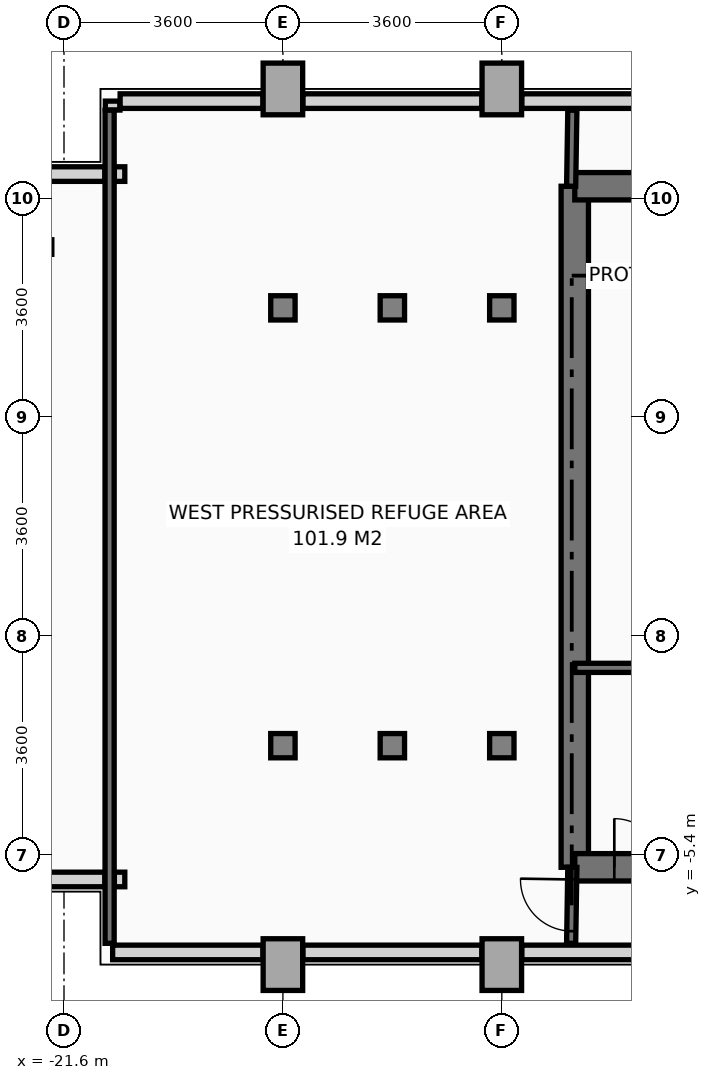
"""IFC4 building model, lengths in metres.
Left out: names, types, materials, properties, quantities, classifications, styles, units other than length and angle.
Written with IfcOpenShell. Run it as: python <this file> out.ifc"""

import sys

from ifc_helpers import new_model, si_unit, direction, frame, frame_2d, origin, origin_2d, place, context, subcontext, project, spatial, rectangle, i_section, extrude, source, transform, mapped, element, fill, save


model = new_model("IFC4")
c1 = context("Model", 3, precision=1e-05, world=origin(), true_north=direction((0.0, 1.0)))
c2 = subcontext(c1, "Body", "Model", "MODEL_VIEW")
j1 = project(units=[si_unit("LENGTHUNIT", "METRE"), si_unit("PLANEANGLEUNIT", "RADIAN")], contexts=[c1])
p1 = place(None, origin())
s1 = spatial("IfcSite", under=j1, at=p1, CompositionType="ELEMENT")
p2 = place(p1, origin())
s2 = spatial("IfcBuilding", under=s1, at=p2, CompositionType="ELEMENT")
p3 = place(p2, frame((0.0, 0.0, 151.6)))
s3 = spatial("IfcBuildingStorey", under=s2, at=p3, CompositionType="ELEMENT", Elevation=151.6)
m1 = source(origin(), c2, "Body", "SweptSolid", [
    extrude(rectangle(XDim=0.65, YDim=0.85, at=origin_2d()), origin(), (0.0, 0.0, 1.0), 4.4),
])
p4 = place(p3, frame((-18.0, -7.2, 0.0), z_axis=(0.0, 0.0, 1.0), x_axis=(1.0, 0.0, 0.0)))
e1 = element("IfcColumn", 1, at=p4, inside=s3, PredefinedType="COLUMN", context=c2, shape_type="MappedRepresentation", body=[
    mapped(m1, transform((0.0, 0.0, 0.0), x_axis=(1.0, 0.0, 0.0), y_axis=(0.0, 1.0, 0.0), z_axis=(0.0, 0.0, 1.0), scale=1.0)),
])
m2 = source(origin(), c2, "Body", "SweptSolid", [
    extrude(i_section(OverallWidth=0.401, OverallDepth=0.399, WebThickness=0.02, FlangeThickness=0.032, at=origin_2d()), origin(), (0.0, 0.0, 1.0), 4.4),
])
for number, where, z_axis, x_axis in (
    (2, (-18.0, -3.6, 0.0), (0.0, 0.0, 1.0), (1.0, 0.0, 0.0)),
    (3, (-18.0, 3.6, 0.0), (0.0, 0.0, 1.0), (1.0, 0.0, 0.0)),
):
    element("IfcColumn", number, at=place(p3, frame(where, z_axis=z_axis, x_axis=x_axis)), inside=s3, PredefinedType="COLUMN", context=c2, shape_type="MappedRepresentation", body=[
        mapped(m2, transform((0.0, 0.0, 0.0), x_axis=(1.0, 0.0, 0.0), y_axis=(0.0, 1.0, 0.0), z_axis=(0.0, 0.0, 1.0), scale=1.0)),
    ])
p5 = place(p3, frame((-18.0, 7.2, 0.0), z_axis=(0.0, 0.0, 1.0), x_axis=(1.0, 0.0, 0.0)))
e4 = element("IfcColumn", 4, at=p5, inside=s3, PredefinedType="COLUMN", context=c2, shape_type="MappedRepresentation", body=[
    mapped(m1, transform((0.0, 0.0, 0.0), x_axis=(1.0, 0.0, 0.0), y_axis=(0.0, 1.0, 0.0), z_axis=(0.0, 0.0, 1.0), scale=1.0)),
])
for number, where, z_axis, x_axis in (
    (5, (-16.2, -3.6, 0.0), (0.0, 0.0, 1.0), (1.0, 0.0, 0.0)),
    (6, (-16.2, 3.6, 0.0), (0.0, 0.0, 1.0), (1.0, 0.0, 0.0)),
):
    element("IfcColumn", number, at=place(p3, frame(where, z_axis=z_axis, x_axis=x_axis)), inside=s3, PredefinedType="COLUMN", context=c2, shape_type="MappedRepresentation", body=[
        mapped(m2, transform((0.0, 0.0, 0.0), x_axis=(1.0, 0.0, 0.0), y_axis=(0.0, 1.0, 0.0), z_axis=(0.0, 0.0, 1.0), scale=1.0)),
    ])
p6 = place(p3, frame((-14.4, -7.2, 0.0), z_axis=(0.0, 0.0, 1.0), x_axis=(1.0, 0.0, 0.0)))
e7 = element("IfcColumn", 7, at=p6, inside=s3, PredefinedType="COLUMN", context=c2, shape_type="MappedRepresentation", body=[
    mapped(m1, transform((0.0, 0.0, 0.0), x_axis=(1.0, 0.0, 0.0), y_axis=(0.0, 1.0, 0.0), z_axis=(0.0, 0.0, 1.0), scale=1.0)),
])
for number, where, z_axis, x_axis in (
    (8, (-14.4, -3.6, 0.0), (0.0, 0.0, 1.0), (1.0, 0.0, 0.0)),
    (9, (-14.4, 3.6, 0.0), (0.0, 0.0, 1.0), (1.0, 0.0, 0.0)),
):
    element("IfcColumn", number, at=place(p3, frame(where, z_axis=z_axis, x_axis=x_axis)), inside=s3, PredefinedType="COLUMN", context=c2, shape_type="MappedRepresentation", body=[
        mapped(m2, transform((0.0, 0.0, 0.0), x_axis=(1.0, 0.0, 0.0), y_axis=(0.0, 1.0, 0.0), z_axis=(0.0, 0.0, 1.0), scale=1.0)),
    ])
p7 = place(p3, frame((-14.4, 7.2, 0.0), z_axis=(0.0, 0.0, 1.0), x_axis=(1.0, 0.0, 0.0)))
e10 = element("IfcColumn", 10, at=p7, inside=s3, PredefinedType="COLUMN", context=c2, shape_type="MappedRepresentation", body=[
    mapped(m1, transform((0.0, 0.0, 0.0), x_axis=(1.0, 0.0, 0.0), y_axis=(0.0, 1.0, 0.0), z_axis=(0.0, 0.0, 1.0), scale=1.0)),
])
p8 = place(p3, frame((-9.523, -7.0, 0.0), z_axis=(0.0, 0.0, 1.0), x_axis=(-1.0, 0.0, 0.0)))
e11 = element("IfcWall", 11, at=p8, inside=s3, PredefinedType="PARAPET", context=c2, shape_type="SweptSolid", body=[
    extrude(rectangle(XDim=4.549, YDim=0.24, at=frame_2d((2.274, 0.0))), origin(), (0.0, 0.0, 1.0), 1.15),
])
p9 = place(p3, frame((-14.728, -7.0, 0.0), z_axis=(0.0, 0.0, 1.0), x_axis=(-1.0, 0.0, 0.0)))
e12 = element("IfcWall", 12, at=p9, inside=s3, PredefinedType="PARAPET", context=c2, shape_type="SweptSolid", body=[
    extrude(rectangle(XDim=2.944, YDim=0.24, at=frame_2d((1.472, 0.0))), origin(), (0.0, 0.0, 1.0), 1.15),
])
p10 = place(p3, frame((-18.328, -7.0, 0.0), z_axis=(0.0, 0.0, 1.0), x_axis=(-1.0, 0.0, 0.0)))
e13 = element("IfcWall", 13, at=p10, inside=s3, PredefinedType="PARAPET", context=c2, shape_type="SweptSolid", body=[
    extrude(rectangle(XDim=2.472, YDim=0.24, at=frame_2d((1.236, 0.0))), origin(), (0.0, 0.0, 1.0), 1.15),
])
p11 = place(p3, frame((-20.6, -5.8, 0.0), z_axis=(0.0, 0.0, 1.0), x_axis=(-1.0, 0.0, 0.0)))
e14 = element("IfcWall", 14, at=p11, inside=s3, PredefinedType="PARAPET", context=c2, shape_type="SweptSolid", body=[
    extrude(rectangle(XDim=0.172, YDim=0.24, at=frame_2d((0.086, 0.0))), origin(), (0.0, 0.0, 1.0), 1.15),
])
p12 = place(p3, frame((-20.928, -5.8, 0.0), z_axis=(0.0, 0.0, 1.0), x_axis=(-1.0, 0.0, 0.0)))
e15 = element("IfcWall", 15, at=p12, inside=s3, PredefinedType="PARAPET", context=c2, shape_type="SweptSolid", body=[
    extrude(rectangle(XDim=1.072, YDim=0.24, at=frame_2d((0.536, 0.0))), origin(), (0.0, 0.0, 1.0), 1.15),
])
p13 = place(p3, frame((-21.877, 5.8, 0.0), z_axis=(0.0, 0.0, 1.0), x_axis=(1.0, 0.0, 0.0)))
e16 = element("IfcWall", 16, at=p13, inside=s3, PredefinedType="PARAPET", context=c2, shape_type="SweptSolid", body=[
    extrude(rectangle(XDim=0.949, YDim=0.24, at=frame_2d((0.475, 0.0))), origin(), (0.0, 0.0, 1.0), 1.15),
])
p14 = place(p3, frame((-20.772, 5.8, 0.0), z_axis=(0.0, 0.0, 1.0), x_axis=(1.0, 0.0, 0.0)))
e17 = element("IfcWall", 17, at=p14, inside=s3, PredefinedType="PARAPET", context=c2, shape_type="SweptSolid", body=[
    extrude(rectangle(XDim=0.172, YDim=0.24, at=frame_2d((0.086, 0.0))), origin(), (0.0, 0.0, 1.0), 1.15),
])
p15 = place(p3, frame((-20.8, 6.853, 0.0), z_axis=(0.0, 0.0, 1.0), x_axis=(0.0, 1.0, 0.0)))
e18 = element("IfcWall", 18, at=p15, inside=s3, PredefinedType="PARAPET", context=c2, shape_type="SweptSolid", body=[
    extrude(rectangle(XDim=0.147, YDim=0.24, at=frame_2d((0.073, 0.0))), origin(), (0.0, 0.0, 1.0), 1.15),
])
p16 = place(p3, frame((-20.677, 7.0, 0.0), z_axis=(0.0, 0.0, 1.0), x_axis=(1.0, 0.0, 0.0)))
e19 = element("IfcWall", 19, at=p16, inside=s3, PredefinedType="PARAPET", context=c2, shape_type="SweptSolid", body=[
    extrude(rectangle(XDim=2.349, YDim=0.24, at=frame_2d((1.175, 0.0))), origin(), (0.0, 0.0, 1.0), 1.15),
])
p17 = place(p3, frame((-17.672, 7.0, 0.0), z_axis=(0.0, 0.0, 1.0), x_axis=(1.0, 0.0, 0.0)))
e20 = element("IfcWall", 20, at=p17, inside=s3, PredefinedType="PARAPET", context=c2, shape_type="SweptSolid", body=[
    extrude(rectangle(XDim=2.944, YDim=0.24, at=frame_2d((1.472, 0.0))), origin(), (0.0, 0.0, 1.0), 1.15),
])
p18 = place(p3, frame((-14.072, 7.0, 0.0), z_axis=(0.0, 0.0, 1.0), x_axis=(1.0, 0.0, 0.0)))
e21 = element("IfcWall", 21, at=p18, inside=s3, PredefinedType="PARAPET", context=c2, shape_type="SweptSolid", body=[
    extrude(rectangle(XDim=2.669, YDim=0.24, at=frame_2d((1.334, 0.0))), origin(), (0.0, 0.0, 1.0), 1.15),
])
p19 = place(p3, frame((-13.2, -5.6, 0.0), z_axis=(0.0, 0.0, 1.0), x_axis=(0.0, 1.0, 0.0)))
e22 = element("IfcWall", 22, at=p19, inside=s3, PredefinedType="SHEAR", context=c2, shape_type="SweptSolid", body=[
    extrude(rectangle(XDim=11.2, YDim=0.45, at=frame_2d((5.6, 0.0))), origin(), (0.0, 0.0, 1.0), 4.4),
])
p20 = place(p3, frame((-13.2, 5.6, 0.0), z_axis=(0.0, 0.0, 1.0), x_axis=(1.0, 0.0, 0.0)))
e23 = element("IfcWall", 23, at=p20, inside=s3, PredefinedType="SHEAR", context=c2, shape_type="SweptSolid", body=[
    extrude(rectangle(XDim=1.819, YDim=0.45, at=frame_2d((0.909, 0.0))), origin(), (0.0, 0.0, 1.0), 4.4),
])
p21 = place(p3, frame((-13.2, -5.6, 0.0), z_axis=(0.0, 0.0, 1.0), x_axis=(1.0, 0.0, 0.0)))
e24 = element("IfcWall", 24, at=p21, inside=s3, PredefinedType="SHEAR", context=c2, shape_type="SweptSolid", body=[
    extrude(rectangle(XDim=7.8, YDim=0.45, at=frame_2d((3.9, 0.0))), origin(), (0.0, 0.0, 1.0), 4.4),
])
p22 = place(p21, frame((3.6, 0.0, 0.0)))
e25 = element("IfcOpeningElement", 25, at=p22, cuts=e24, PredefinedType="OPENING", context=c2, shape_type="SweptSolid", body=[
    extrude(rectangle(XDim=1.2, YDim=2.2, at=frame_2d((0.6, 1.1))), frame((0.0, 0.235, 0.0), z_axis=(0.0, -1.0, 0.0), x_axis=(1.0, 0.0, 0.0)), (0.0, 0.0, 1.0), 0.47),
])
p23 = place(p21, frame((0.65, 0.0, 0.0)))
e26 = element("IfcOpeningElement", 26, at=p23, cuts=e24, PredefinedType="OPENING", context=c2, shape_type="SweptSolid", body=[
    extrude(rectangle(XDim=0.8, YDim=2.1, at=frame_2d((0.4, 1.05))), frame((0.0, 0.235, 0.0), z_axis=(0.0, -1.0, 0.0), x_axis=(1.0, 0.0, 0.0)), (0.0, 0.0, 1.0), 0.47),
])
p24 = place(p3, frame((-13.2, -2.32, 0.0), z_axis=(0.0, 0.0, 1.0), x_axis=(1.0, 0.0, 0.0)))
e27 = element("IfcWall", 27, at=p24, inside=s3, PredefinedType="PARTITIONING", context=c2, shape_type="SweptSolid", body=[
    extrude(rectangle(XDim=2.18, YDim=0.15, at=frame_2d((1.09, 0.0))), origin(), (0.0, 0.0, 1.0), 4.4),
])
p25 = place(p3, frame((-13.26, -6.85, 0.0), z_axis=(0.0, 0.0, 1.0), x_axis=(0.016013571389, 0.999871774545, 0.0)))
e28 = element("IfcWall", 28, at=p25, inside=s3, PredefinedType="PARTITIONING", context=c2, shape_type="SweptSolid", body=[
    extrude(rectangle(XDim=1.25, YDim=0.15, at=frame_2d((0.625, 0.0))), origin(), (0.0, 0.0, 1.0), 4.4),
])
p26 = place(p25, frame((0.2, 0.0, 0.0)))
e29 = element("IfcOpeningElement", 29, at=p26, cuts=e28, PredefinedType="OPENING", context=c2, shape_type="SweptSolid", body=[
    extrude(rectangle(XDim=0.85, YDim=2.1, at=frame_2d((0.425, 1.05))), frame((0.0, 0.085, 0.0), z_axis=(0.0, -1.0, 0.0), x_axis=(1.0, 0.0, 0.0)), (0.0, 0.0, 1.0), 0.17),
])
p27 = place(p3, frame((-13.26, 5.6, 0.0), z_axis=(0.0, 0.0, 1.0), x_axis=(0.016013571389, 0.999871774545, 0.0)))
e30 = element("IfcWall", 30, at=p27, inside=s3, PredefinedType="PARTITIONING", context=c2, shape_type="SweptSolid", body=[
    extrude(rectangle(XDim=1.25, YDim=0.15, at=frame_2d((0.625, 0.0))), origin(), (0.0, 0.0, 1.0), 4.4),
])
p28 = place(p3, frame((-20.85, -6.85, 0.0), z_axis=(0.0, 0.0, 1.0), x_axis=(0.0, 1.0, 0.0)))
e31 = element("IfcWall", 31, at=p28, inside=s3, PredefinedType="PARTITIONING", context=c2, shape_type="SweptSolid", body=[
    extrude(rectangle(XDim=13.7, YDim=0.15, at=frame_2d((6.85, 0.0))), origin(), (0.0, 0.0, 1.0), 4.4),
])
m3 = source(origin(), c2, "Body", "SweptSolid", [
    extrude(rectangle(XDim=0.8, YDim=2.1, at=frame_2d((0.4, 1.05))), frame((0.0, 0.025, 0.0), z_axis=(0.0, -1.0, 0.0), x_axis=(1.0, 0.0, 0.0)), (0.0, 0.0, 1.0), 0.05),
])
p29 = place(p23, origin())
e32 = element("IfcDoor", 32, at=p29, inside=s3, OperationType="SINGLE_SWING_LEFT", PredefinedType="DOOR", context=c2, shape_type="MappedRepresentation", body=[
    mapped(m3, transform((0.0, 0.0, 0.0), x_axis=(1.0, 0.0, 0.0), y_axis=(0.0, 1.0, 0.0), z_axis=(0.0, 0.0, 1.0), scale=1.0)),
])
fill(e26, e32)
m4 = source(origin(), c2, "Body", "SweptSolid", [
    extrude(rectangle(XDim=0.85, YDim=2.1, at=frame_2d((0.425, 1.05))), frame((0.0, 0.025, 0.0), z_axis=(0.0, -1.0, 0.0), x_axis=(1.0, 0.0, 0.0)), (0.0, 0.0, 1.0), 0.05),
])
p30 = place(p26, origin())
e33 = element("IfcDoor", 33, at=p30, inside=s3, OperationType="SINGLE_SWING_RIGHT", PredefinedType="DOOR", context=c2, shape_type="MappedRepresentation", body=[
    mapped(m4, transform((0.0, 0.0, 0.0), x_axis=(1.0, 0.0, 0.0), y_axis=(0.0, 1.0, 0.0), z_axis=(0.0, 0.0, 1.0), scale=1.0)),
])
fill(e29, e33)
save(model, sys.argv[1])
